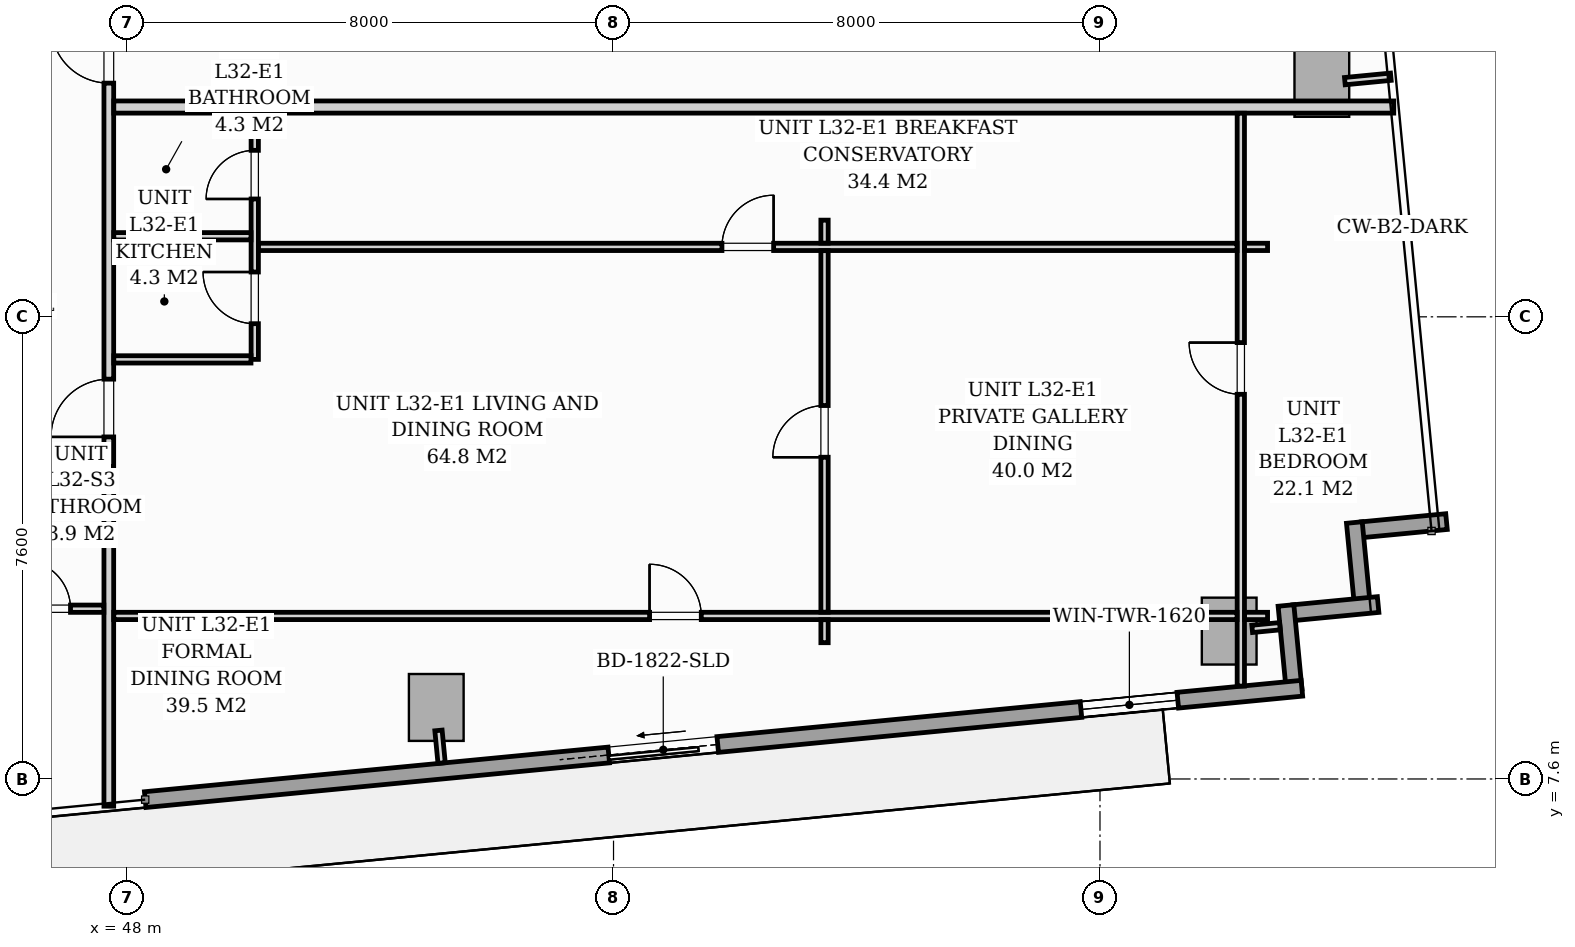
"""IFC4 building model, lengths in metres.
Left out: names, types, materials, properties, quantities, classifications, styles, units other than length and angle.
Written with IfcOpenShell. Run it as: python <this file> out.ifc"""

import sys

from ifc_helpers import new_model, si_unit, direction, frame, frame_2d, origin, origin_2d, place, context, subcontext, project, spatial, rectangle, extrude, source, transform, mapped, element, fill, save


model = new_model("IFC4")
c1 = context("Model", 3, precision=1e-05, world=origin(), true_north=direction((0.0, 1.0)))
c2 = subcontext(c1, "Body", "Model", "MODEL_VIEW")
j1 = project(units=[si_unit("LENGTHUNIT", "METRE"), si_unit("PLANEANGLEUNIT", "RADIAN")], contexts=[c1])
p1 = place(None, origin())
s1 = spatial("IfcSite", under=j1, at=p1, CompositionType="ELEMENT")
p2 = place(p1, origin())
s2 = spatial("IfcBuilding", under=s1, at=p2, CompositionType="ELEMENT")
p3 = place(p2, frame((0.0, 0.0, 113.0)))
s3 = spatial("IfcBuildingStorey", under=s2, at=p3, CompositionType="ELEMENT", Elevation=113.0)
m1 = source(origin(), c2, "Body", "SweptSolid", [
    extrude(rectangle(XDim=0.9, YDim=1.1, at=origin_2d()), origin(), (0.0, 0.0, 1.0), 3.196),
])
for number, where, z_axis, x_axis in (
    (1, (53.085, 8.776, 0.002), (0.0, 0.0, 1.0), (0.995, 0.096, 0.0)),
    (2, (66.125, 10.032, 0.002), (0.0, 0.0, 1.0), (0.995, 0.096, 0.0)),
    (3, (67.648, 19.039, 0.002), (0.0, 0.0, 1.0), (0.995, 0.096, 0.0)),
):
    element("IfcColumn", number, at=place(p3, frame(where, z_axis=z_axis, x_axis=x_axis)), inside=s3, PredefinedType="COLUMN", context=c2, shape_type="MappedRepresentation", body=[
        mapped(m1, transform((0.0, 0.0, 0.0), scale=1.0)),
    ])
for number, where, z_axis, x_axis in (
    (4, (69.698, 11.833, 0.0), (0.0, 0.0, 1.0), (-0.995, -0.096, 0.0)),
    (5, (68.183, 11.817, 0.0), (0.0, 0.0, 1.0), (0.096, -0.995, 0.0)),
):
    element("IfcWall", number, at=place(p3, frame(where, z_axis=z_axis, x_axis=x_axis)), inside=s3, PredefinedType="STANDARD", context=c2, shape_type="SweptSolid", body=[
        extrude(rectangle(XDim=1.395, YDim=0.26, at=frame_2d((0.697, 0.0))), origin(), (0.0, 0.0, 1.0), 2.94),
    ])
p4 = place(p3, frame((68.574, 10.469, 0.0), z_axis=(0.0, 0.0, 1.0), x_axis=(-0.99540774648, -0.095725744959, 0.0)))
e6 = element("IfcWall", 6, at=p4, inside=s3, PredefinedType="STANDARD", context=c2, shape_type="SweptSolid", body=[
    extrude(rectangle(XDim=1.395, YDim=0.26, at=frame_2d((0.698, 0.0))), origin(), (0.0, 0.0, 1.0), 2.94),
])
p5 = place(p3, frame((67.059, 10.453, 0.0), z_axis=(0.0, 0.0, 1.0), x_axis=(0.095915846097, -0.995389446633, 0.0)))
e7 = element("IfcWall", 7, at=p5, inside=s3, PredefinedType="STANDARD", context=c2, shape_type="SweptSolid", body=[
    extrude(rectangle(XDim=1.395, YDim=0.26, at=frame_2d((0.697, 0.0))), origin(), (0.0, 0.0, 1.0), 2.94),
])
p6 = place(p3, frame((67.32, 9.092, 0.0), z_axis=(0.0, 0.0, 1.0), x_axis=(-0.995396521236, -0.095842399342, 0.0)))
e8 = element("IfcWall", 8, at=p6, inside=s3, PredefinedType="STANDARD", context=c2, shape_type="SweptSolid", body=[
    extrude(rectangle(XDim=19.11, YDim=0.26, at=frame_2d((9.555, 0.0))), origin(), (0.0, 0.0, 1.0), 2.94),
])
p7 = place(p6, frame((9.651, 0.0, 0.0)))
e9 = element("IfcOpeningElement", 9, at=p7, cuts=e8, PredefinedType="OPENING", context=c2, shape_type="SweptSolid", body=[
    extrude(rectangle(XDim=1.8, YDim=2.06, at=frame_2d((0.9, 1.03))), frame((0.0, 0.14, 0.0), z_axis=(0.0, -1.0, 0.0), x_axis=(1.0, 0.0, 0.0)), (0.0, 0.0, 1.0), 0.28),
])
p8 = place(p6, frame((2.05, 0.0, 0.65)))
e10 = element("IfcOpeningElement", 10, at=p8, cuts=e8, PredefinedType="OPENING", context=c2, shape_type="SweptSolid", body=[
    extrude(rectangle(XDim=1.6, YDim=1.5, at=frame_2d((0.8, 0.75))), frame((0.0, 0.14, 0.0), z_axis=(0.0, -1.0, 0.0), x_axis=(1.0, 0.0, 0.0)), (0.0, 0.0, 1.0), 0.28),
])
p9 = place(p3, frame((21.5, 12.65, 0.0), z_axis=(0.0, 0.0, 1.0), x_axis=(1.0, 0.0, 0.0)))
e11 = element("IfcWall", 11, at=p9, inside=s3, PredefinedType="PARTITIONING", context=c2, shape_type="SweptSolid", body=[
    extrude(rectangle(XDim=26.2, YDim=0.16, at=frame_2d((13.1, 0.0))), origin(), (0.0, 0.0, 1.0), 2.94),
])
p10 = place(p9, frame((5.927, 0.0, 0.0)))
e12 = element("IfcOpeningElement", 12, at=p10, cuts=e11, PredefinedType="OPENING", context=c2, shape_type="SweptSolid", body=[
    extrude(rectangle(XDim=0.95, YDim=2.06, at=frame_2d((0.475, 1.03))), frame((0.0, 0.09, 0.0), z_axis=(0.0, -1.0, 0.0), x_axis=(1.0, 0.0, 0.0)), (0.0, 0.0, 1.0), 0.18),
])
p11 = place(p9, frame((10.575, 0.0, 0.0)))
e13 = element("IfcOpeningElement", 13, at=p11, cuts=e11, PredefinedType="OPENING", context=c2, shape_type="SweptSolid", body=[
    extrude(rectangle(XDim=0.95, YDim=2.06, at=frame_2d((0.475, 1.03))), frame((0.0, 0.09, 0.0), z_axis=(0.0, -1.0, 0.0), x_axis=(1.0, 0.0, 0.0)), (0.0, 0.0, 1.0), 0.18),
])
p12 = place(p9, frame((19.322, 0.0, 0.0)))
e14 = element("IfcOpeningElement", 14, at=p12, cuts=e11, PredefinedType="OPENING", context=c2, shape_type="SweptSolid", body=[
    extrude(rectangle(XDim=0.95, YDim=2.06, at=frame_2d((0.475, 1.03))), frame((0.0, 0.09, 0.0), z_axis=(0.0, -1.0, 0.0), x_axis=(1.0, 0.0, 0.0)), (0.0, 0.0, 1.0), 0.18),
])
p13 = place(p3, frame((47.7, 7.153, 0.0), z_axis=(0.0, 0.0, 1.0), x_axis=(0.0, 1.0, 0.0)))
e15 = element("IfcWall", 15, at=p13, inside=s3, PredefinedType="PARTITIONING", context=c2, shape_type="SweptSolid", body=[
    extrude(rectangle(XDim=5.416, YDim=0.16, at=frame_2d((2.708, 0.0))), origin(), (0.0, 0.0, 1.0), 2.94),
])
p14 = place(p3, frame((47.7, 12.732, 0.0), z_axis=(0.0, 0.0, 1.0), x_axis=(0.0, 1.0, 0.0)))
e16 = element("IfcWall", 16, at=p14, inside=s3, PredefinedType="PARTITIONING", context=c2, shape_type="SweptSolid", body=[
    extrude(rectangle(XDim=7.918, YDim=0.16, at=frame_2d((3.959, 0.0))), origin(), (0.0, 0.0, 1.0), 2.94),
])
p15 = place(p14, frame((0.493, 0.0, 0.0)))
e17 = element("IfcOpeningElement", 17, at=p15, cuts=e16, PredefinedType="OPENING", context=c2, shape_type="SweptSolid", body=[
    extrude(rectangle(XDim=0.95, YDim=2.06, at=frame_2d((0.475, 1.03))), frame((0.0, 0.09, 0.0), z_axis=(0.0, -1.0, 0.0), x_axis=(1.0, 0.0, 0.0)), (0.0, 0.0, 1.0), 0.18),
])
p16 = place(p14, frame((6.311, 0.0, 0.0)))
e18 = element("IfcOpeningElement", 18, at=p16, cuts=e16, PredefinedType="OPENING", context=c2, shape_type="SweptSolid", body=[
    extrude(rectangle(XDim=0.95, YDim=2.06, at=frame_2d((0.475, 1.03))), frame((0.0, 0.09, 0.0), z_axis=(0.0, -1.0, 0.0), x_axis=(1.0, 0.0, 0.0)), (0.0, 0.0, 1.0), 0.18),
])
p17 = place(p3, frame((43.52, 10.4, 0.0), z_axis=(0.0, 0.0, 1.0), x_axis=(1.0, 0.0, 0.0)))
e19 = element("IfcWall", 19, at=p17, inside=s3, PredefinedType="PARTITIONING", context=c2, shape_type="SweptSolid", body=[
    extrude(rectangle(XDim=4.098, YDim=0.12, at=frame_2d((2.049, 0.0))), origin(), (0.0, 0.0, 1.0), 2.94),
])
p18 = place(p17, frame((0.675, 0.0, 0.0)))
e20 = element("IfcOpeningElement", 20, at=p18, cuts=e19, PredefinedType="OPENING", context=c2, shape_type="SweptSolid", body=[
    extrude(rectangle(XDim=0.85, YDim=2.05, at=frame_2d((0.425, 1.025))), frame((0.0, 0.07, 0.0), z_axis=(0.0, -1.0, 0.0), x_axis=(1.0, 0.0, 0.0)), (0.0, 0.0, 1.0), 0.14),
])
p19 = place(p17, frame((2.75, 0.0, 0.0)))
e21 = element("IfcOpeningElement", 21, at=p19, cuts=e19, PredefinedType="OPENING", context=c2, shape_type="SweptSolid", body=[
    extrude(rectangle(XDim=0.8, YDim=2.02, at=frame_2d((0.4, 1.01))), frame((0.0, 0.07, 0.0), z_axis=(0.0, -1.0, 0.0), x_axis=(1.0, 0.0, 0.0)), (0.0, 0.0, 1.0), 0.14),
])
p20 = place(p3, frame((47.782, 18.65, 0.0), z_axis=(0.0, 0.0, 1.0), x_axis=(1.0, 0.0, 0.0)))
e22 = element("IfcWall", 22, at=p20, inside=s3, PredefinedType="PARTITIONING", context=c2, shape_type="SweptSolid", body=[
    extrude(rectangle(XDim=21.049, YDim=0.2, at=frame_2d((10.525, 0.0))), origin(), (0.0, 0.0, 1.0), 2.063),
])
p21 = place(p3, frame((50.1, 14.5, 0.0), z_axis=(0.0, 0.0, 1.0), x_axis=(0.0, 1.0, 0.0)))
e23 = element("IfcWall", 23, at=p21, inside=s3, PredefinedType="PARTITIONING", context=c2, shape_type="SweptSolid", body=[
    extrude(rectangle(XDim=4.048, YDim=0.12, at=frame_2d((2.024, 0.0))), origin(), (0.0, 0.0, 1.0), 2.94),
])
p22 = place(p21, frame((0.587, 0.0, 0.0)))
e24 = element("IfcOpeningElement", 24, at=p22, cuts=e23, PredefinedType="OPENING", context=c2, shape_type="SweptSolid", body=[
    extrude(rectangle(XDim=0.85, YDim=2.05, at=frame_2d((0.425, 1.025))), frame((0.0, 0.07, 0.0), z_axis=(0.0, -1.0, 0.0), x_axis=(1.0, 0.0, 0.0)), (0.0, 0.0, 1.0), 0.14),
])
p23 = place(p21, frame((2.638, 0.0, 0.0)))
e25 = element("IfcOpeningElement", 25, at=p23, cuts=e23, PredefinedType="OPENING", context=c2, shape_type="SweptSolid", body=[
    extrude(rectangle(XDim=0.8, YDim=2.02, at=frame_2d((0.4, 1.01))), frame((0.0, 0.07, 0.0), z_axis=(0.0, -1.0, 0.0), x_axis=(1.0, 0.0, 0.0)), (0.0, 0.0, 1.0), 0.14),
])
for number, where, z_axis, x_axis in (
    (26, (47.782, 16.525, 0.0), (0.0, 0.0, 1.0), (1.0, 0.0, 0.0)),
    (27, (47.782, 14.5, 0.0), (0.0, 0.0, 1.0), (1.0, 0.0, 0.0)),
):
    element("IfcWall", number, at=place(p3, frame(where, z_axis=z_axis, x_axis=x_axis)), inside=s3, PredefinedType="PARTITIONING", context=c2, shape_type="SweptSolid", body=[
        extrude(rectangle(XDim=2.256, YDim=0.12, at=frame_2d((1.128, 0.0))), origin(), (0.0, 0.0, 1.0), 2.94),
    ])
p24 = place(p3, frame((66.316, 9.128, 0.0), z_axis=(0.0, 0.0, 1.0), x_axis=(0.0, 1.0, 0.0)))
e28 = element("IfcWall", 28, at=p24, inside=s3, PredefinedType="PARTITIONING", context=c2, shape_type="SweptSolid", body=[
    extrude(rectangle(XDim=9.42, YDim=0.12, at=frame_2d((4.71, 0.0))), origin(), (0.0, 0.0, 1.0), 2.31),
])
p25 = place(p24, frame((4.798, 0.0, 0.0)))
e29 = element("IfcOpeningElement", 29, at=p25, cuts=e28, PredefinedType="OPENING", context=c2, shape_type="SweptSolid", body=[
    extrude(rectangle(XDim=0.85, YDim=2.05, at=frame_2d((0.425, 1.025))), frame((0.0, 0.07, 0.0), z_axis=(0.0, -1.0, 0.0), x_axis=(1.0, 0.0, 0.0)), (0.0, 0.0, 1.0), 0.14),
])
p26 = place(p3, frame((47.782, 10.281, 0.0), z_axis=(0.0, 0.0, 1.0), x_axis=(1.0, 0.0, 0.0)))
e30 = element("IfcWall", 30, at=p26, inside=s3, PredefinedType="PARTITIONING", context=c2, shape_type="SweptSolid", body=[
    extrude(rectangle(XDim=18.472, YDim=0.12, at=frame_2d((9.236, 0.0))), origin(), (0.0, 0.0, 1.0), 2.94),
])
p27 = place(p26, frame((8.811, 0.0, 0.0)))
e31 = element("IfcOpeningElement", 31, at=p27, cuts=e30, PredefinedType="OPENING", context=c2, shape_type="SweptSolid", body=[
    extrude(rectangle(XDim=0.85, YDim=2.05, at=frame_2d((0.425, 1.025))), frame((0.0, 0.07, 0.0), z_axis=(0.0, -1.0, 0.0), x_axis=(1.0, 0.0, 0.0)), (0.0, 0.0, 1.0), 0.14),
])
p28 = place(p3, frame((66.378, 10.281, 0.0), z_axis=(0.0, 0.0, 1.0), x_axis=(1.0, 0.0, 0.0)))
e32 = element("IfcWall", 32, at=p28, inside=s3, PredefinedType="PARTITIONING", context=c2, shape_type="SweptSolid", body=[
    extrude(rectangle(XDim=0.378, YDim=0.12, at=frame_2d((0.189, 0.0))), origin(), (0.0, 0.0, 1.0), 2.94),
])
p29 = place(p3, frame((50.162, 16.35, 0.0), z_axis=(0.0, 0.0, 1.0), x_axis=(1.0, 0.0, 0.0)))
e33 = element("IfcWall", 33, at=p29, inside=s3, PredefinedType="PARTITIONING", context=c2, shape_type="SweptSolid", body=[
    extrude(rectangle(XDim=16.092, YDim=0.12, at=frame_2d((8.046, 0.0))), origin(), (0.0, 0.0, 1.0), 2.94),
])
p30 = place(p29, frame((7.621, 0.0, 0.0)))
e34 = element("IfcOpeningElement", 34, at=p30, cuts=e33, PredefinedType="OPENING", context=c2, shape_type="SweptSolid", body=[
    extrude(rectangle(XDim=0.85, YDim=2.05, at=frame_2d((0.425, 1.025))), frame((0.0, 0.07, 0.0), z_axis=(0.0, -1.0, 0.0), x_axis=(1.0, 0.0, 0.0)), (0.0, 0.0, 1.0), 0.14),
])
p31 = place(p3, frame((66.378, 16.35, 0.0), z_axis=(0.0, 0.0, 1.0), x_axis=(1.0, 0.0, 0.0)))
e35 = element("IfcWall", 35, at=p31, inside=s3, PredefinedType="PARTITIONING", context=c2, shape_type="SweptSolid", body=[
    extrude(rectangle(XDim=0.378, YDim=0.12, at=frame_2d((0.189, 0.0))), origin(), (0.0, 0.0, 1.0), 2.94),
])
p32 = place(p3, frame((59.47, 9.841, 0.0), z_axis=(0.0, 0.0, 1.0), x_axis=(0.0, 1.0, 0.0)))
e36 = element("IfcWall", 36, at=p32, inside=s3, PredefinedType="PARTITIONING", context=c2, shape_type="SweptSolid", body=[
    extrude(rectangle(XDim=0.378, YDim=0.12, at=frame_2d((0.189, 0.0))), origin(), (0.0, 0.0, 1.0), 2.94),
])
p33 = place(p3, frame((59.47, 10.343, 0.0), z_axis=(0.0, 0.0, 1.0), x_axis=(0.0, 1.0, 0.0)))
e37 = element("IfcWall", 37, at=p33, inside=s3, PredefinedType="PARTITIONING", context=c2, shape_type="SweptSolid", body=[
    extrude(rectangle(XDim=5.945, YDim=0.12, at=frame_2d((2.973, 0.0))), origin(), (0.0, 0.0, 1.0), 2.94),
])
p34 = place(p33, frame((2.548, 0.0, 0.0)))
e38 = element("IfcOpeningElement", 38, at=p34, cuts=e37, PredefinedType="OPENING", context=c2, shape_type="SweptSolid", body=[
    extrude(rectangle(XDim=0.85, YDim=2.05, at=frame_2d((0.425, 1.025))), frame((0.0, 0.07, 0.0), z_axis=(0.0, -1.0, 0.0), x_axis=(1.0, 0.0, 0.0)), (0.0, 0.0, 1.0), 0.14),
])
p35 = place(p3, frame((59.47, 16.412, 0.0), z_axis=(0.0, 0.0, 1.0), x_axis=(0.0, 1.0, 0.0)))
e39 = element("IfcWall", 39, at=p35, inside=s3, PredefinedType="PARTITIONING", context=c2, shape_type="SweptSolid", body=[
    extrude(rectangle(XDim=0.378, YDim=0.12, at=frame_2d((0.189, 0.0))), origin(), (0.0, 0.0, 1.0), 2.94),
])
p36 = place(p3, frame((53.121, 8.398, 0.0), z_axis=(0.0, 0.0, 1.0), x_axis=(0.096179204763, -0.995364034196, 0.0)))
e40 = element("IfcWall", 40, at=p36, inside=s3, PredefinedType="PARTITIONING", context=c2, shape_type="SweptSolid", body=[
    extrude(rectangle(XDim=0.538, YDim=0.12, at=frame_2d((0.269, 0.0))), origin(), (0.0, 0.0, 1.0), 2.94),
])
p37 = place(p3, frame((66.503, 10.068, 0.0), z_axis=(0.0, 0.0, 1.0), x_axis=(0.995389482415, 0.095915474751, 0.0)))
e41 = element("IfcWall", 41, at=p37, inside=s3, PredefinedType="PARTITIONING", context=c2, shape_type="SweptSolid", body=[
    extrude(rectangle(XDim=0.458, YDim=0.12, at=frame_2d((0.229, 0.0))), origin(), (0.0, 0.0, 1.0), 2.94),
])
p38 = place(p3, frame((68.027, 19.076, 0.0), z_axis=(0.0, 0.0, 1.0), x_axis=(0.995377786728, 0.096036772582, 0.0)))
e42 = element("IfcWall", 42, at=p38, inside=s3, PredefinedType="PARTITIONING", context=c2, shape_type="SweptSolid", body=[
    extrude(rectangle(XDim=0.76, YDim=0.12, at=frame_2d((0.38, 0.0))), origin(), (0.0, 0.0, 1.0), 2.94),
])
m2 = source(origin(), c2, "Body", "SweptSolid", [
    extrude(rectangle(XDim=1.8, YDim=2.06, at=frame_2d((0.9, 1.03))), frame((0.0, 0.025, 0.0), z_axis=(0.0, -1.0, 0.0), x_axis=(1.0, 0.0, 0.0)), (0.0, 0.0, 1.0), 0.05),
])
p39 = place(p7, origin())
e43 = element("IfcDoor", 43, at=p39, inside=s3, OperationType="SLIDING_TO_RIGHT", PredefinedType="DOOR", context=c2, shape_type="MappedRepresentation", body=[
    mapped(m2, transform((0.0, 0.0, 0.0), scale=1.0)),
])
fill(e9, e43)
m3 = source(origin(), c2, "Body", "SweptSolid", [
    extrude(rectangle(XDim=1.6, YDim=1.5, at=frame_2d((0.8, 0.75))), frame((0.0, 0.03, 0.0), z_axis=(0.0, -1.0, 0.0), x_axis=(1.0, 0.0, 0.0)), (0.0, 0.0, 1.0), 0.06),
])
p40 = place(p8, origin())
e44 = element("IfcWindow", 44, at=p40, inside=s3, PartitioningType="SINGLE_PANEL", PredefinedType="WINDOW", context=c2, shape_type="MappedRepresentation", body=[
    mapped(m3, transform((0.0, 0.0, 0.0), scale=1.0)),
])
fill(e10, e44)
m4 = source(origin(), c2, "Body", "SweptSolid", [
    extrude(rectangle(XDim=0.8, YDim=2.02, at=frame_2d((0.4, 1.01))), frame((0.0, 0.025, 0.0), z_axis=(0.0, -1.0, 0.0), x_axis=(1.0, 0.0, 0.0)), (0.0, 0.0, 1.0), 0.05),
])
p41 = place(p19, origin())
e45 = element("IfcDoor", 45, at=p41, inside=s3, OperationType="SINGLE_SWING_LEFT", PredefinedType="DOOR", context=c2, shape_type="MappedRepresentation", body=[
    mapped(m4, transform((0.0, 0.0, 0.0), scale=1.0)),
])
fill(e21, e45)
m5 = source(origin(), c2, "Body", "SweptSolid", [
    extrude(rectangle(XDim=0.95, YDim=2.06, at=frame_2d((0.475, 1.03))), frame((0.0, 0.025, 0.0), z_axis=(0.0, -1.0, 0.0), x_axis=(1.0, 0.0, 0.0)), (0.0, 0.0, 1.0), 0.05),
])
p42 = place(p15, origin())
e46 = element("IfcDoor", 46, at=p42, inside=s3, OperationType="SINGLE_SWING_LEFT", PredefinedType="DOOR", context=c2, shape_type="MappedRepresentation", body=[
    mapped(m5, transform((0.0, 0.0, 0.0), scale=1.0)),
])
fill(e17, e46)
m6 = source(origin(), c2, "Body", "SweptSolid", [
    extrude(rectangle(XDim=0.85, YDim=2.05, at=frame_2d((0.425, 1.025))), frame((0.0, 0.025, 0.0), z_axis=(0.0, -1.0, 0.0), x_axis=(1.0, 0.0, 0.0)), (0.0, 0.0, 1.0), 0.05),
])
p43 = place(p22, origin())
e47 = element("IfcDoor", 47, at=p43, inside=s3, OperationType="SINGLE_SWING_RIGHT", PredefinedType="DOOR", context=c2, shape_type="MappedRepresentation", body=[
    mapped(m6, transform((0.0, 0.0, 0.0), scale=1.0)),
])
fill(e24, e47)
p44 = place(p23, origin())
e48 = element("IfcDoor", 48, at=p44, inside=s3, OperationType="SINGLE_SWING_LEFT", PredefinedType="DOOR", context=c2, shape_type="MappedRepresentation", body=[
    mapped(m4, transform((0.0, 0.0, 0.0), scale=1.0)),
])
fill(e25, e48)
p45 = place(p25, origin())
e49 = element("IfcDoor", 49, at=p45, inside=s3, OperationType="SINGLE_SWING_RIGHT", PredefinedType="DOOR", context=c2, shape_type="MappedRepresentation", body=[
    mapped(m6, transform((0.0, 0.0, 0.0), scale=1.0)),
])
fill(e29, e49)
p46 = place(p27, origin())
e50 = element("IfcDoor", 50, at=p46, inside=s3, OperationType="SINGLE_SWING_LEFT", PredefinedType="DOOR", context=c2, shape_type="MappedRepresentation", body=[
    mapped(m6, transform((0.0, 0.0, 0.0), scale=1.0)),
])
fill(e31, e50)
p47 = place(p30, origin())
e51 = element("IfcDoor", 51, at=p47, inside=s3, OperationType="SINGLE_SWING_RIGHT", PredefinedType="DOOR", context=c2, shape_type="MappedRepresentation", body=[
    mapped(m6, transform((0.0, 0.0, 0.0), scale=1.0)),
])
fill(e34, e51)
p48 = place(p34, origin())
e52 = element("IfcDoor", 52, at=p48, inside=s3, OperationType="SINGLE_SWING_LEFT", PredefinedType="DOOR", context=c2, shape_type="MappedRepresentation", body=[
    mapped(m6, transform((0.0, 0.0, 0.0), scale=1.0)),
])
fill(e38, e52)
p49 = place(p16, origin())
e53 = element("IfcDoor", 53, at=p49, inside=s3, OperationType="SINGLE_SWING_RIGHT", PredefinedType="DOOR", context=c2, shape_type="MappedRepresentation", body=[
    mapped(m5, transform((0.0, 0.0, 0.0), scale=1.0)),
])
fill(e18, e53)
save(model, sys.argv[1])
